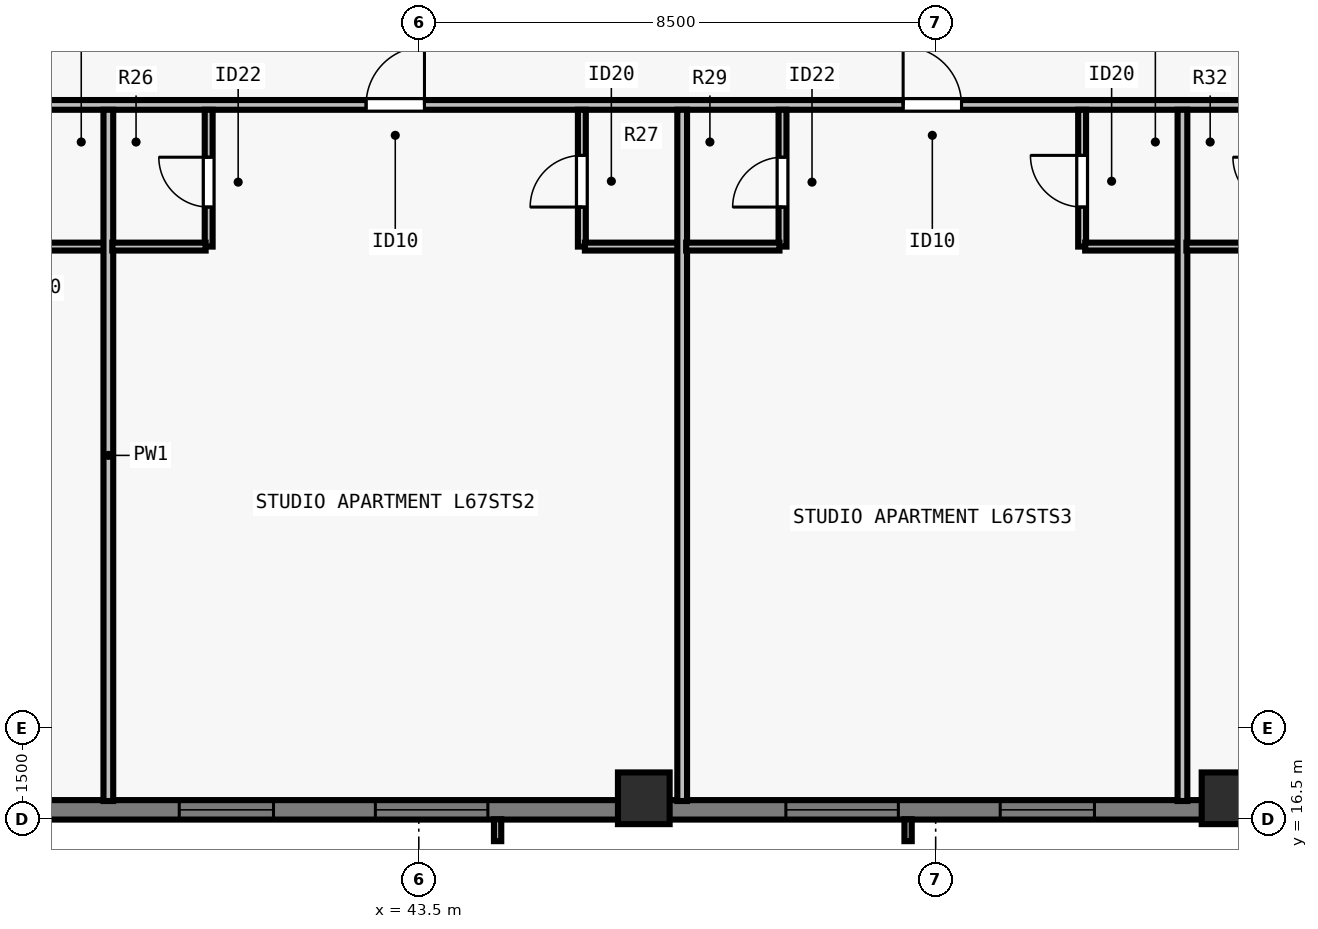
"""IFC4 building model, lengths in metres.
Left out: names, types, materials, properties, quantities, classifications, styles, units other than length and angle.
Written with IfcOpenShell. Run it as: python <this file> out.ifc"""

import sys

from ifc_helpers import new_model, si_unit, direction, frame, frame_2d, origin, origin_2d, place, context, subcontext, project, spatial, rectangle, extrude, element, fill, save


model = new_model("IFC4")
c1 = context("Model", 3, precision=1e-05, world=origin(), true_north=direction((0.0, 1.0)))
c2 = subcontext(c1, "Body", "Model", "MODEL_VIEW")
j1 = project(units=[si_unit("LENGTHUNIT", "METRE"), si_unit("PLANEANGLEUNIT", "RADIAN")], contexts=[c1])
p1 = place(None, origin())
s1 = spatial("IfcSite", under=j1, at=p1, CompositionType="ELEMENT")
p2 = place(p1, origin())
s2 = spatial("IfcBuilding", under=s1, at=p2, CompositionType="ELEMENT")
p3 = place(p2, frame((0.0, 0.0, 244.5)))
s3 = spatial("IfcBuildingStorey", under=s2, at=p3, CompositionType="ELEMENT", Elevation=244.5)
for number, where, z_axis, x_axis in (
    (1, (47.2, 16.85, 0.0), (0.0, 0.0, 1.0), (1.0, 0.0, 0.0)),
    (2, (56.8, 16.85, 0.0), (0.0, 0.0, 1.0), (1.0, 0.0, 0.0)),
):
    element("IfcColumn", number, at=place(p3, frame(where, z_axis=z_axis, x_axis=x_axis)), inside=s3, PredefinedType="COLUMN", context=c2, shape_type="SweptSolid", body=[
        extrude(rectangle(XDim=0.85, YDim=0.85, at=origin_2d()), origin(), (0.0, 0.0, 1.0), 3.5),
    ])
p4 = place(p3, frame((69.5, 16.66, 0.0), z_axis=(0.0, 0.0, 1.0), x_axis=(-1.0, 0.0, 0.0)))
e3 = element("IfcWall", 3, at=p4, inside=s3, PredefinedType="SOLIDWALL", context=c2, shape_type="SweptSolid", body=[
    extrude(rectangle(XDim=34.702, YDim=0.32, at=frame_2d((17.351, 0.0))), origin(), (0.0, 0.0, 1.0), 3.29),
])
p5 = place(p4, frame((4.613, 0.0, 0.8)))
e4 = element("IfcOpeningElement", 4, at=p5, cuts=e3, PredefinedType="OPENING", context=c2, shape_type="SweptSolid", body=[
    extrude(rectangle(XDim=1.85, YDim=1.678, at=frame_2d((0.925, 0.839))), frame((0.0, 0.17, 0.0), z_axis=(0.0, -1.0, 0.0), x_axis=(1.0, 0.0, 0.0)), (0.0, 0.0, 1.0), 0.34),
])
p6 = place(p4, frame((8.138, 0.0, 0.8)))
e5 = element("IfcOpeningElement", 5, at=p6, cuts=e3, PredefinedType="OPENING", context=c2, shape_type="SweptSolid", body=[
    extrude(rectangle(XDim=1.55, YDim=1.678, at=frame_2d((0.775, 0.839))), frame((0.0, 0.17, 0.0), z_axis=(0.0, -1.0, 0.0), x_axis=(1.0, 0.0, 0.0)), (0.0, 0.0, 1.0), 0.34),
])
p7 = place(p4, frame((10.113, 0.0, 0.8)))
e6 = element("IfcOpeningElement", 6, at=p7, cuts=e3, PredefinedType="OPENING", context=c2, shape_type="SweptSolid", body=[
    extrude(rectangle(XDim=1.85, YDim=1.678, at=frame_2d((0.925, 0.839))), frame((0.0, 0.17, 0.0), z_axis=(0.0, -1.0, 0.0), x_axis=(1.0, 0.0, 0.0)), (0.0, 0.0, 1.0), 0.34),
])
p8 = place(p4, frame((14.888, 0.0, 0.8)))
e7 = element("IfcOpeningElement", 7, at=p8, cuts=e3, PredefinedType="OPENING", context=c2, shape_type="SweptSolid", body=[
    extrude(rectangle(XDim=1.55, YDim=1.678, at=frame_2d((0.775, 0.839))), frame((0.0, 0.17, 0.0), z_axis=(0.0, -1.0, 0.0), x_axis=(1.0, 0.0, 0.0)), (0.0, 0.0, 1.0), 0.34),
])
p9 = place(p4, frame((18.114, 0.0, 0.8)))
e8 = element("IfcOpeningElement", 8, at=p9, cuts=e3, PredefinedType="OPENING", context=c2, shape_type="SweptSolid", body=[
    extrude(rectangle(XDim=1.85, YDim=1.678, at=frame_2d((0.925, 0.839))), frame((0.0, 0.17, 0.0), z_axis=(0.0, -1.0, 0.0), x_axis=(1.0, 0.0, 0.0)), (0.0, 0.0, 1.0), 0.34),
])
p10 = place(p4, frame((24.864, 0.0, 0.8)))
e9 = element("IfcOpeningElement", 9, at=p10, cuts=e3, PredefinedType="OPENING", context=c2, shape_type="SweptSolid", body=[
    extrude(rectangle(XDim=1.85, YDim=1.678, at=frame_2d((0.925, 0.839))), frame((0.0, 0.17, 0.0), z_axis=(0.0, -1.0, 0.0), x_axis=(1.0, 0.0, 0.0)), (0.0, 0.0, 1.0), 0.34),
])
p11 = place(p4, frame((28.389, 0.0, 0.8)))
e10 = element("IfcOpeningElement", 10, at=p11, cuts=e3, PredefinedType="OPENING", context=c2, shape_type="SweptSolid", body=[
    extrude(rectangle(XDim=1.55, YDim=1.678, at=frame_2d((0.775, 0.839))), frame((0.0, 0.17, 0.0), z_axis=(0.0, -1.0, 0.0), x_axis=(1.0, 0.0, 0.0)), (0.0, 0.0, 1.0), 0.34),
])
p12 = place(p3, frame((29.805, 28.252, 0.0), z_axis=(0.0, 0.0, 1.0), x_axis=(1.0, 0.0, 0.0)))
e11 = element("IfcWall", 11, at=p12, inside=s3, PredefinedType="PARTITIONING", context=c2, shape_type="SweptSolid", body=[
    extrude(rectangle(XDim=44.39, YDim=0.16, at=frame_2d((22.195, 0.0))), origin(), (0.0, 0.0, 1.0), 2.958),
])
p13 = place(p12, frame((3.872, 0.0, 0.0)))
e12 = element("IfcOpeningElement", 12, at=p13, cuts=e11, PredefinedType="OPENING", context=c2, shape_type="SweptSolid", body=[
    extrude(rectangle(XDim=0.96, YDim=2.18, at=frame_2d((0.48, 1.09))), frame((0.0, 0.09, 0.0), z_axis=(0.0, -1.0, 0.0), x_axis=(1.0, 0.0, 0.0)), (0.0, 0.0, 1.0), 0.18),
])
p14 = place(p12, frame((12.828, 0.0, 0.0)))
e13 = element("IfcOpeningElement", 13, at=p14, cuts=e11, PredefinedType="OPENING", context=c2, shape_type="SweptSolid", body=[
    extrude(rectangle(XDim=0.96, YDim=2.18, at=frame_2d((0.48, 1.09))), frame((0.0, 0.09, 0.0), z_axis=(0.0, -1.0, 0.0), x_axis=(1.0, 0.0, 0.0)), (0.0, 0.0, 1.0), 0.18),
])
p15 = place(p12, frame((21.66, 0.0, 0.0)))
e14 = element("IfcOpeningElement", 14, at=p15, cuts=e11, PredefinedType="OPENING", context=c2, shape_type="SweptSolid", body=[
    extrude(rectangle(XDim=0.96, YDim=2.18, at=frame_2d((0.48, 1.09))), frame((0.0, 0.09, 0.0), z_axis=(0.0, -1.0, 0.0), x_axis=(1.0, 0.0, 0.0)), (0.0, 0.0, 1.0), 0.18),
])
p16 = place(p12, frame((30.492, 0.0, 0.0)))
e15 = element("IfcOpeningElement", 15, at=p16, cuts=e11, PredefinedType="OPENING", context=c2, shape_type="SweptSolid", body=[
    extrude(rectangle(XDim=0.96, YDim=2.18, at=frame_2d((0.48, 1.09))), frame((0.0, 0.09, 0.0), z_axis=(0.0, -1.0, 0.0), x_axis=(1.0, 0.0, 0.0)), (0.0, 0.0, 1.0), 0.18),
])
p17 = place(p12, frame((39.503, 0.0, 0.0)))
e16 = element("IfcOpeningElement", 16, at=p17, cuts=e11, PredefinedType="OPENING", context=c2, shape_type="SweptSolid", body=[
    extrude(rectangle(XDim=0.96, YDim=2.18, at=frame_2d((0.48, 1.09))), frame((0.0, 0.09, 0.0), z_axis=(0.0, -1.0, 0.0), x_axis=(1.0, 0.0, 0.0)), (0.0, 0.0, 1.0), 0.18),
])
p18 = place(p3, frame((36.794, 25.923, 0.0), z_axis=(0.0, 0.0, 1.0), x_axis=(1.0, 0.0, 0.0)))
e17 = element("IfcWall", 17, at=p18, inside=s3, PredefinedType="PLUMBINGWALL", context=c2, shape_type="SweptSolid", body=[
    extrude(rectangle(XDim=1.6, YDim=0.13, at=frame_2d((0.8, 0.0))), origin(), (0.0, 0.0, 1.0), 3.29),
])
p19 = place(p3, frame((38.395, 16.805, 0.0), z_axis=(0.0, 0.0, 1.0), x_axis=(0.0, 1.0, 0.0)))
e18 = element("IfcWall", 18, at=p19, inside=s3, PredefinedType="PARTITIONING", context=c2, shape_type="SweptSolid", body=[
    extrude(rectangle(XDim=11.368, YDim=0.16, at=frame_2d((5.684, 0.0))), origin(), (0.0, 0.0, 1.0), 2.573),
])
p20 = place(p3, frame((40.044, 25.923, 0.0), z_axis=(0.0, 0.0, 1.0), x_axis=(0.0, 1.0, 0.0)))
e19 = element("IfcWall", 19, at=p20, inside=s3, PredefinedType="PLUMBINGWALL", context=c2, shape_type="SweptSolid", body=[
    extrude(rectangle(XDim=2.25, YDim=0.13, at=frame_2d((1.125, 0.0))), origin(), (0.0, 0.0, 1.0), 3.29),
])
p21 = place(p20, frame((0.65, 0.0, 0.0)))
e20 = element("IfcOpeningElement", 20, at=p21, cuts=e19, PredefinedType="OPENING", context=c2, shape_type="SweptSolid", body=[
    extrude(rectangle(XDim=0.82, YDim=2.1, at=frame_2d((0.41, 1.05))), frame((0.0, 0.075, 0.0), z_axis=(0.0, -1.0, 0.0), x_axis=(1.0, 0.0, 0.0)), (0.0, 0.0, 1.0), 0.15),
])
p22 = place(p3, frame((38.459, 25.923, 0.0), z_axis=(0.0, 0.0, 1.0), x_axis=(1.0, 0.0, 0.0)))
e21 = element("IfcWall", 21, at=p22, inside=s3, PredefinedType="PLUMBINGWALL", context=c2, shape_type="SweptSolid", body=[
    extrude(rectangle(XDim=1.535, YDim=0.13, at=frame_2d((0.768, 0.0))), origin(), (0.0, 0.0, 1.0), 3.29),
])
p23 = place(p3, frame((46.181, 25.923, 0.0), z_axis=(0.0, 0.0, 1.0), x_axis=(0.0, 1.0, 0.0)))
e22 = element("IfcWall", 22, at=p23, inside=s3, PredefinedType="PLUMBINGWALL", context=c2, shape_type="SweptSolid", body=[
    extrude(rectangle(XDim=2.25, YDim=0.13, at=frame_2d((1.125, 0.0))), origin(), (0.0, 0.0, 1.0), 3.29),
])
p24 = place(p23, frame((0.65, 0.0, 0.0)))
e23 = element("IfcOpeningElement", 23, at=p24, cuts=e22, PredefinedType="OPENING", context=c2, shape_type="SweptSolid", body=[
    extrude(rectangle(XDim=0.85, YDim=2.1, at=frame_2d((0.425, 1.05))), frame((0.0, 0.075, 0.0), z_axis=(0.0, -1.0, 0.0), x_axis=(1.0, 0.0, 0.0)), (0.0, 0.0, 1.0), 0.15),
])
p25 = place(p3, frame((46.231, 25.923, 0.0), z_axis=(0.0, 0.0, 1.0), x_axis=(1.0, 0.0, 0.0)))
e24 = element("IfcWall", 24, at=p25, inside=s3, PredefinedType="PLUMBINGWALL", context=c2, shape_type="SweptSolid", body=[
    extrude(rectangle(XDim=1.6, YDim=0.13, at=frame_2d((0.8, 0.0))), origin(), (0.0, 0.0, 1.0), 3.29),
])
p26 = place(p3, frame((47.832, 16.805, 0.0), z_axis=(0.0, 0.0, 1.0), x_axis=(0.0, 1.0, 0.0)))
e25 = element("IfcWall", 25, at=p26, inside=s3, PredefinedType="PARTITIONING", context=c2, shape_type="SweptSolid", body=[
    extrude(rectangle(XDim=11.368, YDim=0.16, at=frame_2d((5.684, 0.0))), origin(), (0.0, 0.0, 1.0), 2.958),
])
p27 = place(p3, frame((49.481, 25.923, 0.0), z_axis=(0.0, 0.0, 1.0), x_axis=(0.0, 1.0, 0.0)))
e26 = element("IfcWall", 26, at=p27, inside=s3, PredefinedType="PLUMBINGWALL", context=c2, shape_type="SweptSolid", body=[
    extrude(rectangle(XDim=2.25, YDim=0.13, at=frame_2d((1.125, 0.0))), origin(), (0.0, 0.0, 1.0), 3.29),
])
p28 = place(p27, frame((0.65, 0.0, 0.0)))
e27 = element("IfcOpeningElement", 27, at=p28, cuts=e26, PredefinedType="OPENING", context=c2, shape_type="SweptSolid", body=[
    extrude(rectangle(XDim=0.82, YDim=2.1, at=frame_2d((0.41, 1.05))), frame((0.0, 0.075, 0.0), z_axis=(0.0, -1.0, 0.0), x_axis=(1.0, 0.0, 0.0)), (0.0, 0.0, 1.0), 0.15),
])
p29 = place(p3, frame((47.896, 25.923, 0.0), z_axis=(0.0, 0.0, 1.0), x_axis=(1.0, 0.0, 0.0)))
e28 = element("IfcWall", 28, at=p29, inside=s3, PredefinedType="PLUMBINGWALL", context=c2, shape_type="SweptSolid", body=[
    extrude(rectangle(XDim=1.535, YDim=0.13, at=frame_2d((0.768, 0.0))), origin(), (0.0, 0.0, 1.0), 3.29),
])
p30 = place(p3, frame((54.408, 25.923, 0.0), z_axis=(0.0, 0.0, 1.0), x_axis=(0.0, 1.0, 0.0)))
e29 = element("IfcWall", 29, at=p30, inside=s3, PredefinedType="PLUMBINGWALL", context=c2, shape_type="SweptSolid", body=[
    extrude(rectangle(XDim=2.25, YDim=0.13, at=frame_2d((1.125, 0.0))), origin(), (0.0, 0.0, 1.0), 2.958),
])
p31 = place(p30, frame((0.65, 0.0, 0.0)))
e30 = element("IfcOpeningElement", 30, at=p31, cuts=e29, PredefinedType="OPENING", context=c2, shape_type="SweptSolid", body=[
    extrude(rectangle(XDim=0.85, YDim=2.1, at=frame_2d((0.425, 1.05))), frame((0.0, 0.075, 0.0), z_axis=(0.0, -1.0, 0.0), x_axis=(1.0, 0.0, 0.0)), (0.0, 0.0, 1.0), 0.15),
])
p32 = place(p3, frame((54.458, 25.923, 0.0), z_axis=(0.0, 0.0, 1.0), x_axis=(1.0, 0.0, 0.0)))
e31 = element("IfcWall", 31, at=p32, inside=s3, PredefinedType="PLUMBINGWALL", context=c2, shape_type="SweptSolid", body=[
    extrude(rectangle(XDim=1.6, YDim=0.13, at=frame_2d((0.8, 0.0))), origin(), (0.0, 0.0, 1.0), 3.29),
])
p33 = place(p3, frame((56.059, 16.805, 0.0), z_axis=(0.0, 0.0, 1.0), x_axis=(0.0, 1.0, 0.0)))
e32 = element("IfcWall", 32, at=p33, inside=s3, PredefinedType="PARTITIONING", context=c2, shape_type="SweptSolid", body=[
    extrude(rectangle(XDim=11.368, YDim=0.16, at=frame_2d((5.684, 0.0))), origin(), (0.0, 0.0, 1.0), 3.29),
])
p34 = place(p3, frame((56.124, 25.923, 0.0), z_axis=(0.0, 0.0, 1.0), x_axis=(1.0, 0.0, 0.0)))
e33 = element("IfcWall", 33, at=p34, inside=s3, PredefinedType="PLUMBINGWALL", context=c2, shape_type="SweptSolid", body=[
    extrude(rectangle(XDim=1.535, YDim=0.13, at=frame_2d((0.768, 0.0))), origin(), (0.0, 0.0, 1.0), 3.29),
])
p35 = place(p8, origin())
e34 = element("IfcWindow", 34, at=p35, inside=s3, PartitioningType="SINGLE_PANEL", PredefinedType="WINDOW", context=c2, shape_type="SweptSolid", body=[
    extrude(rectangle(XDim=1.55, YDim=1.678, at=frame_2d((0.775, 0.839))), frame((0.0, -0.05, 0.0), z_axis=(0.0, -1.0, 0.0), x_axis=(1.0, 0.0, 0.0)), (0.0, 0.0, 1.0), 0.06),
])
fill(e7, e34)
p36 = place(p9, origin())
e35 = element("IfcWindow", 35, at=p36, inside=s3, PartitioningType="SINGLE_PANEL", PredefinedType="WINDOW", context=c2, shape_type="SweptSolid", body=[
    extrude(rectangle(XDim=1.85, YDim=1.678, at=frame_2d((0.925, 0.839))), frame((0.0, -0.05, 0.0), z_axis=(0.0, -1.0, 0.0), x_axis=(1.0, 0.0, 0.0)), (0.0, 0.0, 1.0), 0.06),
])
fill(e8, e35)
p37 = place(p10, origin())
e36 = element("IfcWindow", 36, at=p37, inside=s3, PartitioningType="SINGLE_PANEL", PredefinedType="WINDOW", context=c2, shape_type="SweptSolid", body=[
    extrude(rectangle(XDim=1.85, YDim=1.678, at=frame_2d((0.925, 0.839))), frame((0.0, -0.05, 0.0), z_axis=(0.0, -1.0, 0.0), x_axis=(1.0, 0.0, 0.0)), (0.0, 0.0, 1.0), 0.06),
])
fill(e9, e36)
p38 = place(p11, origin())
e37 = element("IfcWindow", 37, at=p38, inside=s3, PartitioningType="SINGLE_PANEL", PredefinedType="WINDOW", context=c2, shape_type="SweptSolid", body=[
    extrude(rectangle(XDim=1.55, YDim=1.678, at=frame_2d((0.775, 0.839))), frame((0.0, -0.05, 0.0), z_axis=(0.0, -1.0, 0.0), x_axis=(1.0, 0.0, 0.0)), (0.0, 0.0, 1.0), 0.06),
])
fill(e10, e37)
p39 = place(p21, origin())
e38 = element("IfcDoor", 38, at=p39, inside=s3, OperationType="SINGLE_SWING_RIGHT", PredefinedType="DOOR", context=c2, shape_type="SweptSolid", body=[
    extrude(rectangle(XDim=0.82, YDim=2.1, at=frame_2d((0.41, 1.05))), frame((0.0, 0.025, 0.0), z_axis=(0.0, -1.0, 0.0), x_axis=(1.0, 0.0, 0.0)), (0.0, 0.0, 1.0), 0.05),
])
fill(e20, e38)
p40 = place(p24, origin())
e39 = element("IfcDoor", 39, at=p40, inside=s3, OperationType="SINGLE_SWING_LEFT", PredefinedType="DOOR", context=c2, shape_type="SweptSolid", body=[
    extrude(rectangle(XDim=0.85, YDim=2.1, at=frame_2d((0.425, 1.05))), frame((0.0, 0.025, 0.0), z_axis=(0.0, -1.0, 0.0), x_axis=(1.0, 0.0, 0.0)), (0.0, 0.0, 1.0), 0.05),
])
fill(e23, e39)
p41 = place(p14, origin())
e40 = element("IfcDoor", 40, at=p41, inside=s3, OperationType="SINGLE_SWING_RIGHT", PredefinedType="DOOR", context=c2, shape_type="SweptSolid", body=[
    extrude(rectangle(XDim=0.96, YDim=2.18, at=frame_2d((0.48, 1.09))), frame((0.0, 0.025, 0.0), z_axis=(0.0, -1.0, 0.0), x_axis=(1.0, 0.0, 0.0)), (0.0, 0.0, 1.0), 0.05),
])
fill(e13, e40)
p42 = place(p28, origin())
e41 = element("IfcDoor", 41, at=p42, inside=s3, OperationType="SINGLE_SWING_LEFT", PredefinedType="DOOR", context=c2, shape_type="SweptSolid", body=[
    extrude(rectangle(XDim=0.82, YDim=2.1, at=frame_2d((0.41, 1.05))), frame((0.0, 0.025, 0.0), z_axis=(0.0, -1.0, 0.0), x_axis=(1.0, 0.0, 0.0)), (0.0, 0.0, 1.0), 0.05),
])
fill(e27, e41)
p43 = place(p31, origin())
e42 = element("IfcDoor", 42, at=p43, inside=s3, OperationType="SINGLE_SWING_RIGHT", PredefinedType="DOOR", context=c2, shape_type="SweptSolid", body=[
    extrude(rectangle(XDim=0.85, YDim=2.1, at=frame_2d((0.425, 1.05))), frame((0.0, 0.025, 0.0), z_axis=(0.0, -1.0, 0.0), x_axis=(1.0, 0.0, 0.0)), (0.0, 0.0, 1.0), 0.05),
])
fill(e30, e42)
p44 = place(p15, origin())
e43 = element("IfcDoor", 43, at=p44, inside=s3, OperationType="SINGLE_SWING_LEFT", PredefinedType="DOOR", context=c2, shape_type="SweptSolid", body=[
    extrude(rectangle(XDim=0.96, YDim=2.18, at=frame_2d((0.48, 1.09))), frame((0.0, 0.025, 0.0), z_axis=(0.0, -1.0, 0.0), x_axis=(1.0, 0.0, 0.0)), (0.0, 0.0, 1.0), 0.05),
])
fill(e14, e43)
save(model, sys.argv[1])
